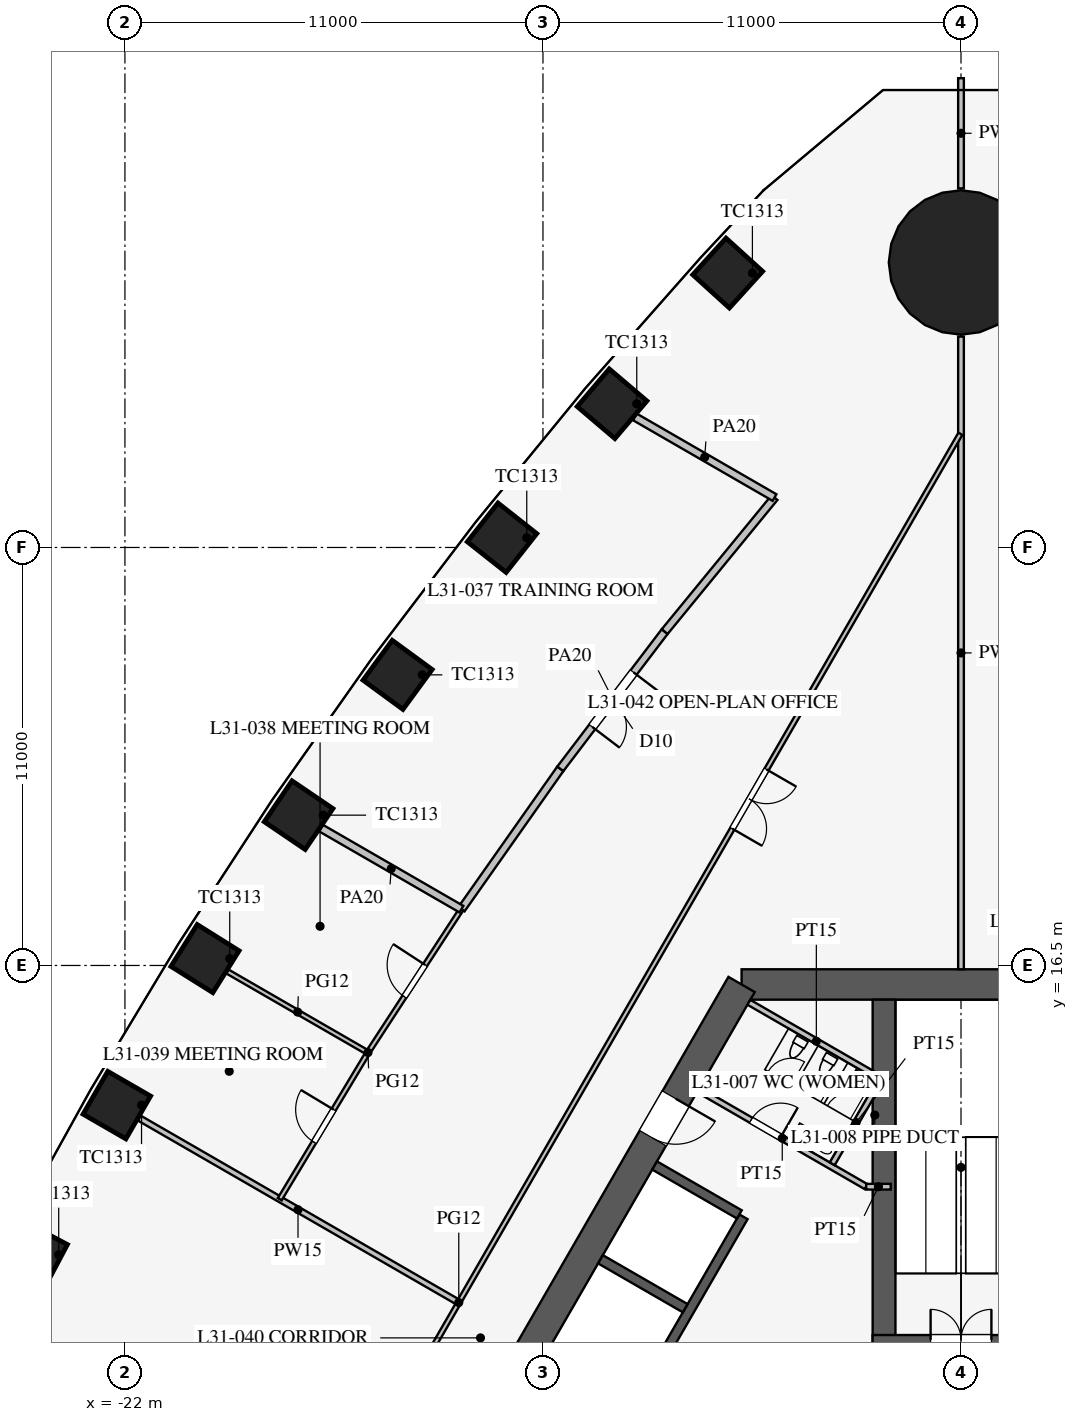
"""IFC4 building model, lengths in metres.
Left out: names, types, materials, properties, quantities, classifications, styles, units other than length and angle.
Written with IfcOpenShell. Run it as: python <this file> out.ifc"""

import sys

from ifc_helpers import new_model, si_unit, direction, frame, frame_2d, origin, origin_2d, place, context, subcontext, project, spatial, rectangle, circle, extrude, element, fill, save


model = new_model("IFC4")
c1 = context("Model", 3, precision=1e-05, world=origin(), true_north=direction((0.0, 1.0)))
c2 = subcontext(c1, "Body", "Model", "MODEL_VIEW")
j1 = project(units=[si_unit("LENGTHUNIT", "METRE"), si_unit("PLANEANGLEUNIT", "RADIAN")], contexts=[c1])
p1 = place(None, origin())
s1 = spatial("IfcSite", under=j1, at=p1, CompositionType="ELEMENT")
p2 = place(p1, origin())
s2 = spatial("IfcBuilding", under=s1, at=p2, CompositionType="ELEMENT")
p3 = place(p2, frame((0.0, 0.0, 136.7)))
s3 = spatial("IfcBuildingStorey", under=s2, at=p3, CompositionType="ELEMENT", Elevation=136.7)
for number, where, z_axis, x_axis in (
    (1, (-6.139, 34.721, 0.0), (0.0, 0.0, 1.0), (-0.672, -0.74, 0.0)),
    (2, (-9.182, 31.282, 0.0), (0.0, 0.0, 1.0), (-0.648, -0.762, 0.0)),
    (3, (-12.077, 27.757, 0.0), (0.0, 0.0, 1.0), (-0.62, -0.785, 0.0)),
    (4, (-14.825, 24.148, 0.0), (0.0, 0.0, 1.0), (-0.591, -0.807, 0.0)),
    (5, (-17.43, 20.456, 0.0), (0.0, 0.0, 1.0), (-0.561, -0.828, 0.0)),
    (6, (-19.893, 16.681, 0.0), (0.0, 0.0, 1.0), (-0.531, -0.847, 0.0)),
    (7, (-22.213, 12.825, 0.0), (0.0, 0.0, 1.0), (-0.5, -0.866, 0.0)),
    (8, (-24.393, 8.887, 0.0), (0.0, 0.0, 1.0), (-0.468, -0.883, 0.0)),
):
    element("IfcColumn", number, at=place(p3, frame(where, z_axis=z_axis, x_axis=x_axis)), inside=s3, PredefinedType="COLUMN", context=c2, shape_type="SweptSolid", body=[
        extrude(rectangle(XDim=1.3, YDim=1.3, at=origin_2d()), origin(), (0.0, 0.0, 1.0), 4.2),
    ])
p4 = place(p3, frame((0.0, 35.0, 0.0), z_axis=(0.0, 0.0, 1.0), x_axis=(1.0, 0.0, 0.0)))
e9 = element("IfcColumn", 9, at=p4, inside=s3, PredefinedType="COLUMN", context=c2, shape_type="SweptSolid", body=[
    extrude(circle(Radius=1.9, at=origin_2d()), origin(), (0.0, 0.0, 1.0), 4.2),
])
p5 = place(p3, frame((5.773, 16.0, 0.0), z_axis=(0.0, 0.0, 1.0), x_axis=(-1.0, 0.0, 0.0)))
e10 = element("IfcWall", 10, at=p5, inside=s3, PredefinedType="SHEAR", context=c2, shape_type="SweptSolid", body=[
    extrude(rectangle(XDim=11.547, YDim=0.8, at=frame_2d((5.773, 0.0))), origin(), (0.0, 0.0, 1.0), 4.2),
])
p6 = place(p3, frame((-5.773, 16.0, 0.0), z_axis=(0.0, 0.0, 1.0), x_axis=(-0.500002442456, -0.866023993627, 0.0)))
e11 = element("IfcWall", 11, at=p6, inside=s3, PredefinedType="SHEAR", context=c2, shape_type="SweptSolid", body=[
    extrude(rectangle(XDim=21.939, YDim=0.8, at=frame_2d((10.97, 0.0))), origin(), (0.0, 0.0, 1.0), 4.2),
])
p7 = place(p6, frame((17.27, 0.0, 0.0)))
e12 = element("IfcOpeningElement", 12, at=p7, cuts=e11, PredefinedType="OPENING", context=c2, shape_type="SweptSolid", body=[
    extrude(rectangle(XDim=1.2, YDim=2.1, at=frame_2d((0.6, 1.05))), frame((0.0, 0.41, 0.0), z_axis=(0.0, -1.0, 0.0), x_axis=(1.0, 0.0, 0.0)), (0.0, 0.0, 1.0), 0.82),
])
p8 = place(p6, frame((3.47, 0.0, 0.0)))
e13 = element("IfcOpeningElement", 13, at=p8, cuts=e11, PredefinedType="OPENING", context=c2, shape_type="SweptSolid", body=[
    extrude(rectangle(XDim=1.2, YDim=2.1, at=frame_2d((0.6, 1.05))), frame((0.0, 0.41, 0.0), z_axis=(0.0, -1.0, 0.0), x_axis=(1.0, 0.0, 0.0)), (0.0, 0.0, 1.0), 0.82),
])
p9 = place(p3, frame((-5.724, 9.886, 0.0), z_axis=(0.0, 0.0, 1.0), x_axis=(-0.500001763848, -0.866024385424, 0.0)))
e14 = element("IfcWall", 14, at=p9, inside=s3, PredefinedType="SHEAR", context=c2, shape_type="SweptSolid", body=[
    extrude(rectangle(XDim=11.4, YDim=0.25, at=frame_2d((5.7, 0.0))), origin(), (0.0, 0.0, 1.0), 4.2),
])
p10 = place(p9, frame((6.525, 0.0, 0.0)))
e15 = element("IfcOpeningElement", 15, at=p10, cuts=e14, PredefinedType="OPENING", context=c2, shape_type="SweptSolid", body=[
    extrude(rectangle(XDim=1.2, YDim=2.2, at=frame_2d((0.6, 1.1))), frame((0.0, 0.135, 0.0), z_axis=(0.0, -1.0, 0.0), x_axis=(1.0, 0.0, 0.0)), (0.0, 0.0, 1.0), 0.27),
])
p11 = place(p9, frame((9.375, 0.0, 0.0)))
e16 = element("IfcOpeningElement", 16, at=p11, cuts=e14, PredefinedType="OPENING", context=c2, shape_type="SweptSolid", body=[
    extrude(rectangle(XDim=1.2, YDim=2.2, at=frame_2d((0.6, 1.1))), frame((0.0, 0.135, 0.0), z_axis=(0.0, -1.0, 0.0), x_axis=(1.0, 0.0, 0.0)), (0.0, 0.0, 1.0), 0.27),
])
p12 = place(p3, frame((-5.832, 9.949, 0.0), z_axis=(0.0, 0.0, 1.0), x_axis=(-0.866029291668, 0.499993265928, 0.0)))
e17 = element("IfcWall", 17, at=p12, inside=s3, PredefinedType="SHEAR", context=c2, shape_type="SweptSolid", body=[
    extrude(rectangle(XDim=2.575, YDim=0.25, at=frame_2d((1.288, 0.0))), origin(), (0.0, 0.0, 1.0), 4.2),
])
p13 = place(p3, frame((-7.257, 7.481, 0.0), z_axis=(0.0, 0.0, 1.0), x_axis=(-0.866046643894, 0.499963209246, 0.0)))
e18 = element("IfcWall", 18, at=p13, inside=s3, PredefinedType="SHEAR", context=c2, shape_type="SweptSolid", body=[
    extrude(rectangle(XDim=2.575, YDim=0.25, at=frame_2d((1.288, 0.0))), origin(), (0.0, 0.0, 1.0), 4.2),
])
p14 = place(p3, frame((-2.025, 6.525, 0.0), z_axis=(0.0, 0.0, 1.0), x_axis=(0.0, 1.0, 0.0)))
e19 = element("IfcWall", 19, at=p14, inside=s3, PredefinedType="SHEAR", context=c2, shape_type="SweptSolid", body=[
    extrude(rectangle(XDim=9.075, YDim=0.6, at=frame_2d((4.538, 0.0))), origin(), (0.0, 0.0, 1.0), 4.2),
])
p15 = place(p3, frame((2.325, 6.65, 0.0), z_axis=(0.0, 0.0, 1.0), x_axis=(-1.0, 0.0, 0.0)))
e20 = element("IfcWall", 20, at=p15, inside=s3, PredefinedType="SHEAR", context=c2, shape_type="SweptSolid", body=[
    extrude(rectangle(XDim=4.65, YDim=0.25, at=frame_2d((2.325, 0.0))), origin(), (0.0, 0.0, 1.0), 4.2),
])
p16 = place(p15, frame((1.525, 0.0, 0.0)))
e21 = element("IfcOpeningElement", 21, at=p16, cuts=e20, PredefinedType="OPENING", context=c2, shape_type="SweptSolid", body=[
    extrude(rectangle(XDim=1.6, YDim=2.1, at=frame_2d((0.8, 1.05))), frame((0.0, 0.135, 0.0), z_axis=(0.0, -1.0, 0.0), x_axis=(1.0, 0.0, 0.0)), (0.0, 0.0, 1.0), 0.27),
])
p17 = place(p3, frame((-2.495, 10.678, 0.0), z_axis=(0.0, 0.0, 1.0), x_axis=(-0.86602216432, 0.500005610874, 0.0)))
e22 = element("IfcWall", 22, at=p17, inside=s3, PredefinedType="PARTITIONING", context=c2, shape_type="SweptSolid", body=[
    extrude(rectangle(XDim=5.1, YDim=0.15, at=frame_2d((2.55, 0.0))), origin(), (0.0, 0.0, 1.0), 4.0),
])
p18 = place(p17, frame((2.6, 0.0, 0.0)))
e23 = element("IfcOpeningElement", 23, at=p18, cuts=e22, PredefinedType="OPENING", context=c2, shape_type="SweptSolid", body=[
    extrude(rectangle(XDim=0.9, YDim=2.1, at=frame_2d((0.45, 1.05))), frame((0.0, 0.085, 0.0), z_axis=(0.0, -1.0, 0.0), x_axis=(1.0, 0.0, 0.0)), (0.0, 0.0, 1.0), 0.17),
])
p19 = place(p3, frame((-2.495, 10.678, 0.0), z_axis=(0.0, 0.0, 1.0), x_axis=(1.0, 0.0, 0.0)))
e24 = element("IfcWall", 24, at=p19, inside=s3, PredefinedType="PARTITIONING", context=c2, shape_type="SweptSolid", body=[
    extrude(rectangle(XDim=0.645, YDim=0.15, at=frame_2d((0.323, 0.0))), origin(), (0.0, 0.0, 1.0), 4.0),
])
p20 = place(p3, frame((-2.031, 13.482, 0.0), z_axis=(0.0, 0.0, 1.0), x_axis=(-0.866050731258, 0.499956128963, 0.0)))
e25 = element("IfcWall", 25, at=p20, inside=s3, PredefinedType="PARTITIONING", context=c2, shape_type="SweptSolid", body=[
    extrude(rectangle(XDim=4.1, YDim=0.15, at=frame_2d((2.05, 0.0))), origin(), (0.0, 0.0, 1.0), 4.0),
])
p21 = place(p3, frame((-3.389, 11.281, 0.0), z_axis=(0.0, 0.0, 1.0), x_axis=(0.499989096993, 0.866031698547, 0.0)))
e26 = element("IfcWall", 26, at=p21, inside=s3, PredefinedType="PARTITIONING", context=c2, shape_type="SweptSolid", body=[
    extrude(rectangle(XDim=2.51, YDim=0.15, at=frame_2d((1.255, 0.0))), origin(), (0.0, 0.0, 1.0), 4.0),
])
p22 = place(p3, frame((0.0, 16.4, 0.0), z_axis=(0.0, 0.0, 1.0), x_axis=(0.0, 1.0, 0.0)))
e27 = element("IfcWall", 27, at=p22, inside=s3, PredefinedType="PARTITIONING", context=c2, shape_type="SweptSolid", body=[
    extrude(rectangle(XDim=16.65, YDim=0.15, at=frame_2d((8.325, 0.0))), origin(), (0.0, 0.0, 1.0), 2.3),
])
p23 = place(p3, frame((0.0, 36.95, 0.0), z_axis=(0.0, 0.0, 1.0), x_axis=(0.0, 1.0, 0.0)))
e28 = element("IfcWall", 28, at=p23, inside=s3, PredefinedType="PARTITIONING", context=c2, shape_type="SweptSolid", body=[
    extrude(rectangle(XDim=2.899, YDim=0.15, at=frame_2d((1.45, 0.0))), origin(), (0.0, 0.0, 1.0), 2.3),
])
p24 = place(p3, frame((-13.268, 7.66, 0.0), z_axis=(0.0, 0.0, 1.0), x_axis=(-0.866015788683, 0.500016653474, 0.0)))
e29 = element("IfcWall", 29, at=p24, inside=s3, PredefinedType="PARTITIONING", context=c2, shape_type="SweptSolid", body=[
    extrude(rectangle(XDim=9.65, YDim=0.15, at=frame_2d((4.825, 0.0))), origin(), (0.0, 0.0, 1.0), 3.2),
])
p25 = place(p3, frame((-0.016, 30.491, 0.0), z_axis=(0.0, 0.0, 1.0), x_axis=(-0.50000091641, -0.866024874695, 0.0)))
e30 = element("IfcWall", 30, at=p25, inside=s3, PredefinedType="PARTITIONING", context=c2, shape_type="SweptSolid", body=[
    extrude(rectangle(XDim=52.796, YDim=0.12, at=frame_2d((26.398, 0.0))), origin(), (0.0, 0.0, 1.0), 2.9),
])
p26 = place(p25, frame((10.2, 0.0, 0.15)))
e31 = element("IfcOpeningElement", 31, at=p26, cuts=e30, PredefinedType="OPENING", context=c2, shape_type="SweptSolid", body=[
    extrude(rectangle(XDim=1.8, YDim=2.1, at=frame_2d((0.9, 1.05))), frame((0.0, 0.07, 0.0), z_axis=(0.0, -1.0, 0.0), x_axis=(1.0, 0.0, 0.0)), (0.0, 0.0, 1.0), 0.14),
])
p27 = place(p25, frame((40.8, 0.0, 0.15)))
e32 = element("IfcOpeningElement", 32, at=p27, cuts=e30, PredefinedType="OPENING", context=c2, shape_type="SweptSolid", body=[
    extrude(rectangle(XDim=1.8, YDim=2.1, at=frame_2d((0.9, 1.05))), frame((0.0, 0.07, 0.0), z_axis=(0.0, -1.0, 0.0), x_axis=(1.0, 0.0, 0.0)), (0.0, 0.0, 1.0), 0.14),
])
p28 = place(p3, frame((-10.543, 21.675, 0.0), z_axis=(0.0, 0.0, 1.0), x_axis=(-0.575987178736, -0.817458726745, 0.0)))
e33 = element("IfcWall", 33, at=p28, inside=s3, PredefinedType="PARTITIONING", context=c2, shape_type="SweptSolid", body=[
    extrude(rectangle(XDim=4.518, YDim=0.2, at=frame_2d((2.259, 0.0))), origin(), (0.0, 0.0, 1.0), 2.9),
])
p29 = place(p3, frame((-7.797, 25.286, 0.0), z_axis=(0.0, 0.0, 1.0), x_axis=(-0.605274299339, -0.796016973789, 0.0)))
e34 = element("IfcWall", 34, at=p29, inside=s3, PredefinedType="PARTITIONING", context=c2, shape_type="SweptSolid", body=[
    extrude(rectangle(XDim=4.536, YDim=0.2, at=frame_2d((2.268, 0.0))), origin(), (0.0, 0.0, 1.0), 2.9),
])
p30 = place(p29, frame((1.35, 0.0, 0.15)))
e35 = element("IfcOpeningElement", 35, at=p30, cuts=e34, PredefinedType="OPENING", context=c2, shape_type="SweptSolid", body=[
    extrude(rectangle(XDim=1.8, YDim=2.1, at=frame_2d((0.9, 1.05))), frame((0.0, 0.11, 0.0), z_axis=(0.0, -1.0, 0.0), x_axis=(1.0, 0.0, 0.0)), (0.0, 0.0, 1.0), 0.22),
])
p31 = place(p3, frame((-4.906, 28.813, 0.0), z_axis=(0.0, 0.0, 1.0), x_axis=(-0.633843962561, -0.773460943503, 0.0)))
e36 = element("IfcWall", 36, at=p31, inside=s3, PredefinedType="PARTITIONING", context=c2, shape_type="SweptSolid", body=[
    extrude(rectangle(XDim=4.561, YDim=0.2, at=frame_2d((2.28, 0.0))), origin(), (0.0, 0.0, 1.0), 2.9),
])
p32 = place(p3, frame((-15.606, 14.206, 0.0), z_axis=(0.0, 0.0, 1.0), x_axis=(-0.515548366618, -0.856860479703, 0.0)))
e37 = element("IfcWall", 37, at=p32, inside=s3, PredefinedType="PARTITIONING", context=c2, shape_type="SweptSolid", body=[
    extrude(rectangle(XDim=4.501, YDim=0.12, at=frame_2d((2.25, 0.0))), origin(), (0.0, 0.0, 1.0), 2.9),
])
p33 = place(p32, frame((1.75, 0.0, 0.15)))
e38 = element("IfcOpeningElement", 38, at=p33, cuts=e37, PredefinedType="OPENING", context=c2, shape_type="SweptSolid", body=[
    extrude(rectangle(XDim=1.0, YDim=2.1, at=frame_2d((0.5, 1.05))), frame((0.0, 0.07, 0.0), z_axis=(0.0, -1.0, 0.0), x_axis=(1.0, 0.0, 0.0)), (0.0, 0.0, 1.0), 0.14),
])
p34 = place(p3, frame((-13.145, 17.982, 0.0), z_axis=(0.0, 0.0, 1.0), x_axis=(-0.546069464151, -0.837739900161, 0.0)))
e39 = element("IfcWall", 39, at=p34, inside=s3, PredefinedType="PARTITIONING", context=c2, shape_type="SweptSolid", body=[
    extrude(rectangle(XDim=4.507, YDim=0.12, at=frame_2d((2.253, 0.0))), origin(), (0.0, 0.0, 1.0), 2.9),
])
p35 = place(p34, frame((1.75, 0.0, 0.15)))
e40 = element("IfcOpeningElement", 40, at=p35, cuts=e39, PredefinedType="OPENING", context=c2, shape_type="SweptSolid", body=[
    extrude(rectangle(XDim=1.0, YDim=2.1, at=frame_2d((0.5, 1.05))), frame((0.0, 0.07, 0.0), z_axis=(0.0, -1.0, 0.0), x_axis=(1.0, 0.0, 0.0)), (0.0, 0.0, 1.0), 0.14),
])
p36 = place(p3, frame((-4.906, 28.813, 0.0), z_axis=(0.0, 0.0, 1.0), x_axis=(-0.866022790583, 0.50000452617, 0.0)))
e41 = element("IfcWall", 41, at=p36, inside=s3, PredefinedType="PARTITIONING", context=c2, shape_type="SweptSolid", body=[
    extrude(rectangle(XDim=4.246, YDim=0.2, at=frame_2d((2.123, 0.0))), origin(), (0.0, 0.0, 1.0), 2.9),
])
p37 = place(p3, frame((-15.606, 14.206, 0.0), z_axis=(0.0, 0.0, 1.0), x_axis=(-0.866020825576, 0.500007929605, 0.0)))
e42 = element("IfcWall", 42, at=p37, inside=s3, PredefinedType="PARTITIONING", context=c2, shape_type="SweptSolid", body=[
    extrude(rectangle(XDim=4.269, YDim=0.12, at=frame_2d((2.135, 0.0))), origin(), (0.0, 0.0, 1.0), 2.9),
])
p38 = place(p3, frame((-13.145, 17.982, 0.0), z_axis=(0.0, 0.0, 1.0), x_axis=(-0.86602643523, 0.49999821348, 0.0)))
e43 = element("IfcWall", 43, at=p38, inside=s3, PredefinedType="PARTITIONING", context=c2, shape_type="SweptSolid", body=[
    extrude(rectangle(XDim=4.266, YDim=0.2, at=frame_2d((2.133, 0.0))), origin(), (0.0, 0.0, 1.0), 2.9),
])
p39 = place(p18, frame((0.9, 0.0, 0.0), z_axis=(0.0, 0.0, 1.0), x_axis=(-1.0, 0.0, 0.0)))
e44 = element("IfcDoor", 44, at=p39, inside=s3, OperationType="SINGLE_SWING_RIGHT", PredefinedType="DOOR", context=c2, shape_type="SweptSolid", body=[
    extrude(rectangle(XDim=0.9, YDim=2.1, at=frame_2d((0.45, 1.05))), frame((0.0, 0.025, 0.0), z_axis=(0.0, -1.0, 0.0), x_axis=(1.0, 0.0, 0.0)), (0.0, 0.0, 1.0), 0.05),
])
fill(e23, e44)
p40 = place(p16, frame((1.6, 0.0, 0.0), z_axis=(0.0, 0.0, 1.0), x_axis=(-1.0, 0.0, 0.0)))
e45 = element("IfcDoor", 45, at=p40, inside=s3, OperationType="DOUBLE_DOOR_SINGLE_SWING", PredefinedType="DOOR", context=c2, shape_type="SweptSolid", body=[
    extrude(rectangle(XDim=1.6, YDim=2.1, at=frame_2d((0.8, 1.05))), frame((0.0, 0.025, 0.0), z_axis=(0.0, -1.0, 0.0), x_axis=(1.0, 0.0, 0.0)), (0.0, 0.0, 1.0), 0.05),
])
fill(e21, e45)
p41 = place(p8, origin())
e46 = element("IfcDoor", 46, at=p41, inside=s3, OperationType="SINGLE_SWING_LEFT", PredefinedType="DOOR", context=c2, shape_type="SweptSolid", body=[
    extrude(rectangle(XDim=1.2, YDim=2.1, at=frame_2d((0.6, 1.05))), frame((0.0, 0.025, 0.0), z_axis=(0.0, -1.0, 0.0), x_axis=(1.0, 0.0, 0.0)), (0.0, 0.0, 1.0), 0.05),
])
fill(e13, e46)
p42 = place(p30, origin())
e47 = element("IfcDoor", 47, at=p42, inside=s3, OperationType="DOUBLE_DOOR_SINGLE_SWING", PredefinedType="DOOR", context=c2, shape_type="SweptSolid", body=[
    extrude(rectangle(XDim=1.8, YDim=2.1, at=frame_2d((0.9, 1.05))), frame((0.0, 0.025, 0.0), z_axis=(0.0, -1.0, 0.0), x_axis=(1.0, 0.0, 0.0)), (0.0, 0.0, 1.0), 0.05),
])
fill(e35, e47)
p43 = place(p35, frame((1.0, 0.0, 0.0), z_axis=(0.0, 0.0, 1.0), x_axis=(-1.0, 0.0, 0.0)))
e48 = element("IfcDoor", 48, at=p43, inside=s3, OperationType="SINGLE_SWING_RIGHT", PredefinedType="DOOR", context=c2, shape_type="SweptSolid", body=[
    extrude(rectangle(XDim=1.0, YDim=2.1, at=frame_2d((0.5, 1.05))), frame((0.0, 0.025, 0.0), z_axis=(0.0, -1.0, 0.0), x_axis=(1.0, 0.0, 0.0)), (0.0, 0.0, 1.0), 0.05),
])
fill(e40, e48)
p44 = place(p33, frame((1.0, 0.0, 0.0), z_axis=(0.0, 0.0, 1.0), x_axis=(-1.0, 0.0, 0.0)))
e49 = element("IfcDoor", 49, at=p44, inside=s3, OperationType="SINGLE_SWING_RIGHT", PredefinedType="DOOR", context=c2, shape_type="SweptSolid", body=[
    extrude(rectangle(XDim=1.0, YDim=2.1, at=frame_2d((0.5, 1.05))), frame((0.0, 0.025, 0.0), z_axis=(0.0, -1.0, 0.0), x_axis=(1.0, 0.0, 0.0)), (0.0, 0.0, 1.0), 0.05),
])
fill(e38, e49)
p45 = place(p26, origin())
e50 = element("IfcDoor", 50, at=p45, inside=s3, OperationType="DOUBLE_DOOR_SINGLE_SWING", PredefinedType="DOOR", context=c2, shape_type="SweptSolid", body=[
    extrude(rectangle(XDim=1.8, YDim=2.1, at=frame_2d((0.9, 1.05))), frame((0.0, 0.025, 0.0), z_axis=(0.0, -1.0, 0.0), x_axis=(1.0, 0.0, 0.0)), (0.0, 0.0, 1.0), 0.05),
])
fill(e31, e50)
save(model, sys.argv[1])
